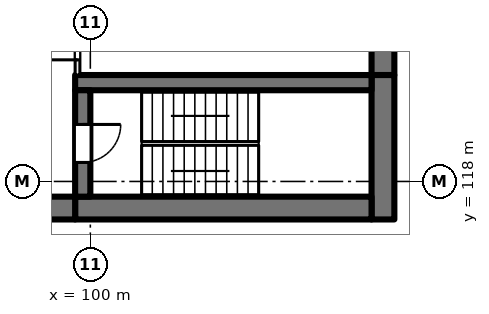
"""IFC4 building model, lengths in metres.
Left out: names, types, materials, properties, quantities, classifications, styles, units other than length and angle.
Written with IfcOpenShell. Run it as: python <this file> out.ifc"""

import sys

from ifc_helpers import new_model, si_unit, direction, frame, frame_2d, origin, place, context, subcontext, project, spatial, rectangle, extrude, element, fill, save


model = new_model("IFC4")
c1 = context("Model", 3, precision=1e-05, world=origin(), true_north=direction((0.0, 1.0)))
c2 = subcontext(c1, "Body", "Model", "MODEL_VIEW")
j1 = project(units=[si_unit("LENGTHUNIT", "METRE"), si_unit("PLANEANGLEUNIT", "RADIAN")], contexts=[c1])
p1 = place(None, origin())
s1 = spatial("IfcSite", under=j1, at=p1, CompositionType="ELEMENT")
p2 = place(p1, origin())
s2 = spatial("IfcBuilding", under=s1, at=p2, CompositionType="ELEMENT")
p3 = place(p2, frame((0.0, 0.0, 101.0)))
s3 = spatial("IfcBuildingStorey", under=s2, at=p3, CompositionType="ELEMENT", Elevation=101.0)
p4 = place(p3, frame((107.7, 135.2, 0.0), z_axis=(0.0, 0.0, 1.0), x_axis=(0.0, -1.0, 0.0)))
e1 = element("IfcWall", 1, at=p4, inside=s3, PredefinedType="SHEAR", context=c2, shape_type="SweptSolid", body=[
    extrude(rectangle(XDim=14.4, YDim=0.6, at=frame_2d((7.2, 0.0))), origin(), (0.0, 0.0, 1.0), 4.0),
])
p5 = place(p3, frame((107.7, 120.8, 0.0), z_axis=(0.0, 0.0, 1.0), x_axis=(0.0, -1.0, 0.0)))
e2 = element("IfcWall", 2, at=p5, inside=s3, PredefinedType="SHEAR", context=c2, shape_type="SweptSolid", body=[
    extrude(rectangle(XDim=3.8, YDim=0.6, at=frame_2d((1.9, 0.0))), origin(), (0.0, 0.0, 1.0), 4.0),
])
p6 = place(p3, frame((107.4, 117.3, 0.0), z_axis=(0.0, 0.0, 1.0), x_axis=(-1.0, 0.0, 0.0)))
e3 = element("IfcWall", 3, at=p6, inside=s3, PredefinedType="SHEAR", context=c2, shape_type="SweptSolid", body=[
    extrude(rectangle(XDim=7.8, YDim=0.6, at=frame_2d((3.9, 0.0))), origin(), (0.0, 0.0, 1.0), 4.0),
])
p7 = place(p3, frame((99.6, 117.3, 0.0), z_axis=(0.0, 0.0, 1.0), x_axis=(-1.0, 0.0, 0.0)))
e4 = element("IfcWall", 4, at=p7, inside=s3, PredefinedType="SHEAR", context=c2, shape_type="SweptSolid", body=[
    extrude(rectangle(XDim=8.925, YDim=0.6, at=frame_2d((4.462, 0.0))), origin(), (0.0, 0.0, 1.0), 4.0),
])
p8 = place(p3, frame((107.4, 120.6, 0.0), z_axis=(0.0, 0.0, 1.0), x_axis=(-1.0, 0.0, 0.0)))
e5 = element("IfcWall", 5, at=p8, inside=s3, PredefinedType="SHEAR", context=c2, shape_type="SweptSolid", body=[
    extrude(rectangle(XDim=7.8, YDim=0.4, at=frame_2d((3.9, 0.0))), origin(), (0.0, 0.0, 1.0), 4.0),
])
p9 = place(p3, frame((99.8, 120.4, 0.0), z_axis=(0.0, 0.0, 1.0), x_axis=(0.0, -1.0, 0.0)))
e6 = element("IfcWall", 6, at=p9, inside=s3, PredefinedType="SHEAR", context=c2, shape_type="SweptSolid", body=[
    extrude(rectangle(XDim=2.8, YDim=0.4, at=frame_2d((1.4, 0.0))), origin(), (0.0, 0.0, 1.0), 4.0),
])
p10 = place(p9, frame((0.9, 0.0, 0.0)))
e7 = element("IfcOpeningElement", 7, at=p10, cuts=e6, PredefinedType="OPENING", context=c2, shape_type="SweptSolid", body=[
    extrude(rectangle(XDim=1.0, YDim=2.1, at=frame_2d((0.5, 1.05))), frame((0.0, 0.21, 0.0), z_axis=(0.0, -1.0, 0.0), x_axis=(1.0, 0.0, 0.0)), (0.0, 0.0, 1.0), 0.42),
])
p11 = place(p3, frame((99.663, 120.8, 0.0), z_axis=(0.0, 0.0, 1.0), x_axis=(0.0, 1.0, 0.0)))
e8 = element("IfcWall", 8, at=p11, inside=s3, PredefinedType="PARTITIONING", context=c2, shape_type="SweptSolid", body=[
    extrude(rectangle(XDim=1.6, YDim=0.125, at=frame_2d((0.8, 0.0))), origin(), (0.0, 0.0, 1.0), 3.625),
])
p12 = place(p11, frame((0.4, 0.0, 0.0)))
e9 = element("IfcOpeningElement", 9, at=p12, cuts=e8, PredefinedType="OPENING", context=c2, shape_type="SweptSolid", body=[
    extrude(rectangle(XDim=0.8, YDim=2.1, at=frame_2d((0.4, 1.05))), frame((0.0, 0.073, 0.0), z_axis=(0.0, -1.0, 0.0), x_axis=(1.0, 0.0, 0.0)), (0.0, 0.0, 1.0), 0.145),
])
p13 = place(p10, origin())
e10 = element("IfcDoor", 10, at=p13, inside=s3, OperationType="SINGLE_SWING_LEFT", PredefinedType="DOOR", context=c2, shape_type="SweptSolid", body=[
    extrude(rectangle(XDim=1.0, YDim=2.1, at=frame_2d((0.5, 1.05))), frame((0.0, 0.025, 0.0), z_axis=(0.0, -1.0, 0.0), x_axis=(1.0, 0.0, 0.0)), (0.0, 0.0, 1.0), 0.05),
])
fill(e7, e10)
p14 = place(p12, origin())
e11 = element("IfcDoor", 11, at=p14, inside=s3, OperationType="SINGLE_SWING_RIGHT", PredefinedType="DOOR", context=c2, shape_type="SweptSolid", body=[
    extrude(rectangle(XDim=0.8, YDim=2.1, at=frame_2d((0.4, 1.05))), frame((0.0, 0.025, 0.0), z_axis=(0.0, -1.0, 0.0), x_axis=(1.0, 0.0, 0.0)), (0.0, 0.0, 1.0), 0.05),
])
fill(e9, e11)
save(model, sys.argv[1])
